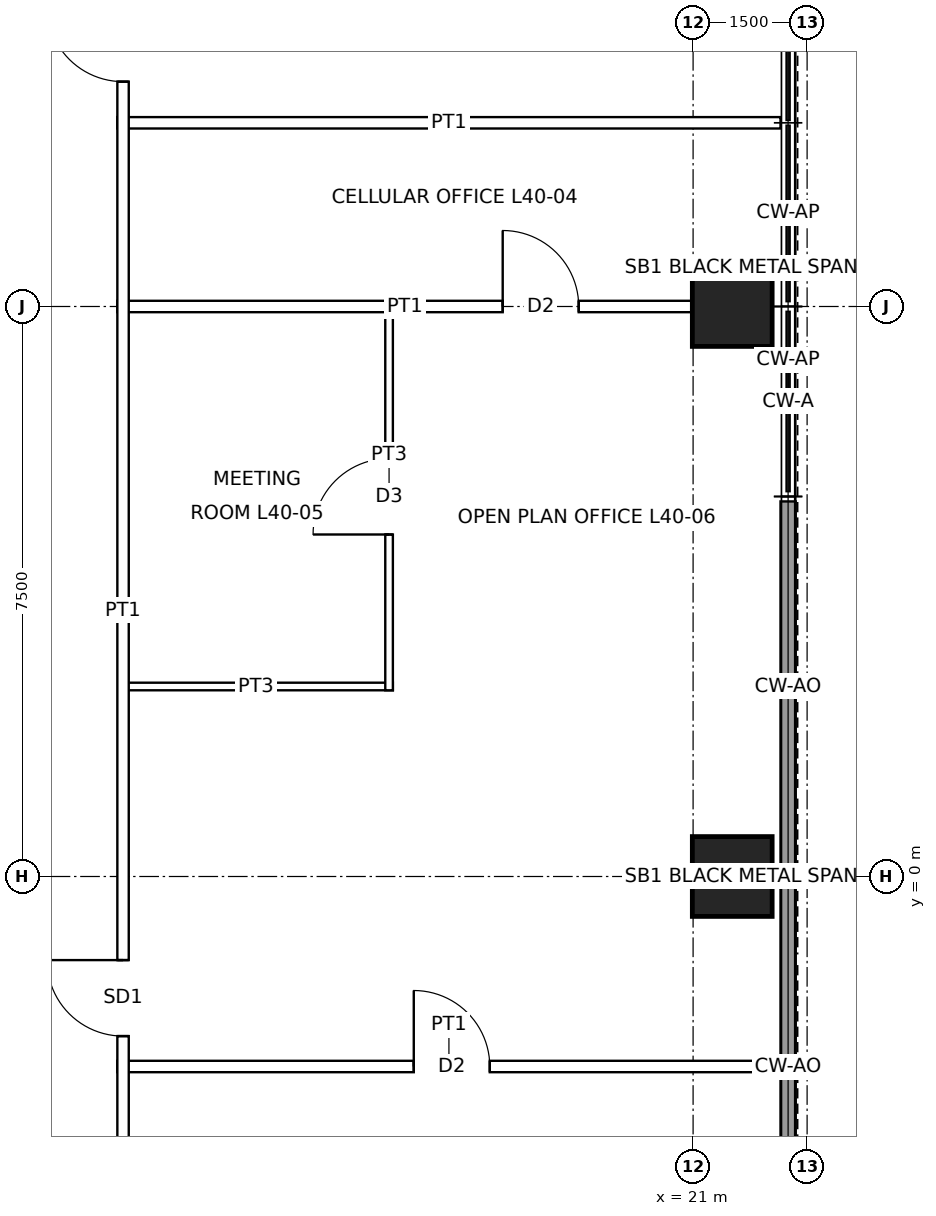
"""IFC4 building model, lengths in metres.
Left out: names, types, materials, properties, quantities, classifications, styles, units other than length and angle.
Written with IfcOpenShell. Run it as: python <this file> out.ifc"""

import sys

from ifc_helpers import new_model, si_unit, direction, frame, frame_2d, origin, origin_2d, place, context, subcontext, project, spatial, rectangle, hollow_rectangle, extrude, element, fill, save


model = new_model("IFC4")
c1 = context("Model", 3, precision=1e-05, world=origin(), true_north=direction((0.0, 1.0)))
c2 = subcontext(c1, "Body", "Model", "MODEL_VIEW")
j1 = project(units=[si_unit("LENGTHUNIT", "METRE"), si_unit("PLANEANGLEUNIT", "RADIAN")], contexts=[c1])
p1 = place(None, origin())
s1 = spatial("IfcSite", under=j1, at=p1, CompositionType="ELEMENT")
p2 = place(p1, origin())
s2 = spatial("IfcBuilding", under=s1, at=p2, CompositionType="ELEMENT")
p3 = place(p2, frame((0.0, 0.0, 193.9)))
s3 = spatial("IfcBuildingStorey", under=s2, at=p3, CompositionType="ELEMENT", Elevation=193.9)
for number, where, z_axis, x_axis in (
    (1, (21.515, 7.5, 0.0), (0.0, 0.0, 1.0), (1.0, 0.0, 0.0)),
    (2, (21.515, 0.0, 0.0), (0.0, 0.0, 1.0), (1.0, 0.0, 0.0)),
):
    element("IfcColumn", number, at=place(p3, frame(where, z_axis=z_axis, x_axis=x_axis)), inside=s3, PredefinedType="COLUMN", context=c2, shape_type="SweptSolid", body=[
        extrude(hollow_rectangle(XDim=1.05, YDim=1.05, WallThickness=0.07, at=origin_2d()), origin(), (0.0, 0.0, 1.0), 4.0),
    ])
for number, where, z_axis, x_axis in (
    (3, (22.25, 4.935, 0.0), (0.0, 0.0, 1.0), (0.0, -1.0, 0.0)),
    (4, (22.25, 2.468, 0.0), (0.0, 0.0, 1.0), (0.0, -1.0, 0.0)),
    (5, (22.25, -0.065, 0.0), (0.0, 0.0, 1.0), (0.0, -1.0, 0.0)),
    (6, (22.25, -2.532, 0.0), (0.0, 0.0, 1.0), (0.0, -1.0, 0.0)),
):
    element("IfcWall", number, at=place(p3, frame(where, z_axis=z_axis, x_axis=x_axis)), inside=s3, PredefinedType="SOLIDWALL", context=c2, shape_type="SweptSolid", body=[
        extrude(rectangle(XDim=2.403, YDim=0.2, at=frame_2d((1.201, 0.0))), origin(), (0.0, 0.0, 1.0), 3.85),
    ])
p4 = place(p3, frame((13.425, -2.5, 0.0), z_axis=(0.0, 0.0, 1.0), x_axis=(1.0, 0.0, 0.0)))
e7 = element("IfcWall", 7, at=p4, inside=s3, PredefinedType="PARTITIONING", context=c2, shape_type="SweptSolid", body=[
    extrude(rectangle(XDim=8.725, YDim=0.15, at=frame_2d((4.362, 0.0))), origin(), (0.0, 0.0, 1.0), 3.85),
])
p5 = place(p4, frame((3.9, 0.0, 0.0)))
e8 = element("IfcOpeningElement", 8, at=p5, cuts=e7, PredefinedType="OPENING", context=c2, shape_type="SweptSolid", body=[
    extrude(rectangle(XDim=1.0, YDim=2.1, at=frame_2d((0.5, 1.05))), frame((0.0, 0.085, 0.0), z_axis=(0.0, -1.0, 0.0), x_axis=(1.0, 0.0, 0.0)), (0.0, 0.0, 1.0), 0.17),
])
p6 = place(p3, frame((13.45, 2.5, 0.0), z_axis=(0.0, 0.0, 1.0), x_axis=(1.0, 0.0, 0.0)))
e9 = element("IfcWall", 9, at=p6, inside=s3, PredefinedType="PARTITIONING", context=c2, shape_type="SweptSolid", body=[
    extrude(rectangle(XDim=3.6, YDim=0.1, at=frame_2d((1.8, 0.0))), origin(), (0.0, 0.0, 1.0), 3.85),
])
p7 = place(p3, frame((13.425, 7.5, 0.0), z_axis=(0.0, 0.0, 1.0), x_axis=(1.0, 0.0, 0.0)))
e10 = element("IfcWall", 10, at=p7, inside=s3, PredefinedType="PARTITIONING", context=c2, shape_type="SweptSolid", body=[
    extrude(rectangle(XDim=7.565, YDim=0.15, at=frame_2d((3.782, 0.0))), origin(), (0.0, 0.0, 1.0), 3.238),
])
p8 = place(p7, frame((5.07, 0.0, 0.0)))
e11 = element("IfcOpeningElement", 11, at=p8, cuts=e10, PredefinedType="OPENING", context=c2, shape_type="SweptSolid", body=[
    extrude(rectangle(XDim=1.0, YDim=2.1, at=frame_2d((0.5, 1.05))), frame((0.0, 0.085, 0.0), z_axis=(0.0, -1.0, 0.0), x_axis=(1.0, 0.0, 0.0)), (0.0, 0.0, 1.0), 0.17),
])
p9 = place(p3, frame((13.425, 9.917, 0.0), z_axis=(0.0, 0.0, 1.0), x_axis=(1.0, 0.0, 0.0)))
e12 = element("IfcWall", 12, at=p9, inside=s3, PredefinedType="PARTITIONING", context=c2, shape_type="SweptSolid", body=[
    extrude(rectangle(XDim=8.725, YDim=0.15, at=frame_2d((4.362, 0.0))), origin(), (0.0, 0.0, 1.0), 3.85),
])
p10 = place(p3, frame((13.5, -5.075, 0.0), z_axis=(0.0, 0.0, 1.0), x_axis=(0.0, 1.0, 0.0)))
e13 = element("IfcWall", 13, at=p10, inside=s3, PredefinedType="PARTITIONING", context=c2, shape_type="SweptSolid", body=[
    extrude(rectangle(XDim=17.15, YDim=0.15, at=frame_2d((8.575, 0.0))), origin(), (0.0, 0.0, 1.0), 3.85),
])
p11 = place(p10, frame((2.975, 0.0, 0.0)))
e14 = element("IfcOpeningElement", 14, at=p11, cuts=e13, PredefinedType="OPENING", context=c2, shape_type="SweptSolid", body=[
    extrude(rectangle(XDim=1.0, YDim=2.4, at=frame_2d((0.5, 1.2))), frame((0.0, 0.085, 0.0), z_axis=(0.0, -1.0, 0.0), x_axis=(1.0, 0.0, 0.0)), (0.0, 0.0, 1.0), 0.17),
])
p12 = place(p10, frame((15.533, 0.0, 0.0)))
e15 = element("IfcOpeningElement", 15, at=p12, cuts=e13, PredefinedType="OPENING", context=c2, shape_type="SweptSolid", body=[
    extrude(rectangle(XDim=1.0, YDim=2.4, at=frame_2d((0.5, 1.2))), frame((0.0, 0.085, 0.0), z_axis=(0.0, -1.0, 0.0), x_axis=(1.0, 0.0, 0.0)), (0.0, 0.0, 1.0), 0.17),
])
p13 = place(p3, frame((17.0, 2.45, 0.0), z_axis=(0.0, 0.0, 1.0), x_axis=(0.0, 1.0, 0.0)))
e16 = element("IfcWall", 16, at=p13, inside=s3, PredefinedType="PARTITIONING", context=c2, shape_type="SweptSolid", body=[
    extrude(rectangle(XDim=5.1, YDim=0.1, at=frame_2d((2.55, 0.0))), origin(), (0.0, 0.0, 1.0), 3.85),
])
p14 = place(p13, frame((2.05, 0.0, 0.0)))
e17 = element("IfcOpeningElement", 17, at=p14, cuts=e16, PredefinedType="OPENING", context=c2, shape_type="SweptSolid", body=[
    extrude(rectangle(XDim=1.0, YDim=2.1, at=frame_2d((0.5, 1.05))), frame((0.0, 0.06, 0.0), z_axis=(0.0, -1.0, 0.0), x_axis=(1.0, 0.0, 0.0)), (0.0, 0.0, 1.0), 0.12),
])
p15 = place(p8, origin())
e18 = element("IfcDoor", 18, at=p15, inside=s3, OperationType="SINGLE_SWING_LEFT", PredefinedType="DOOR", context=c2, shape_type="SweptSolid", body=[
    extrude(rectangle(XDim=1.0, YDim=2.1, at=frame_2d((0.5, 1.05))), frame((0.0, 0.025, 0.0), z_axis=(0.0, -1.0, 0.0), x_axis=(1.0, 0.0, 0.0)), (0.0, 0.0, 1.0), 0.05),
])
fill(e11, e18)
p16 = place(p14, origin())
e19 = element("IfcDoor", 19, at=p16, inside=s3, OperationType="SINGLE_SWING_LEFT", PredefinedType="DOOR", context=c2, shape_type="SweptSolid", body=[
    extrude(rectangle(XDim=1.0, YDim=2.1, at=frame_2d((0.5, 1.05))), frame((0.0, 0.025, 0.0), z_axis=(0.0, -1.0, 0.0), x_axis=(1.0, 0.0, 0.0)), (0.0, 0.0, 1.0), 0.05),
])
fill(e17, e19)
p17 = place(p11, origin())
e20 = element("IfcDoor", 20, at=p17, inside=s3, OperationType="SINGLE_SWING_RIGHT", PredefinedType="DOOR", context=c2, shape_type="SweptSolid", body=[
    extrude(rectangle(XDim=1.0, YDim=2.4, at=frame_2d((0.5, 1.2))), frame((0.0, 0.025, 0.0), z_axis=(0.0, -1.0, 0.0), x_axis=(1.0, 0.0, 0.0)), (0.0, 0.0, 1.0), 0.05),
])
fill(e14, e20)
p18 = place(p5, origin())
e21 = element("IfcDoor", 21, at=p18, inside=s3, OperationType="SINGLE_SWING_LEFT", PredefinedType="DOOR", context=c2, shape_type="SweptSolid", body=[
    extrude(rectangle(XDim=1.0, YDim=2.1, at=frame_2d((0.5, 1.05))), frame((0.0, 0.025, 0.0), z_axis=(0.0, -1.0, 0.0), x_axis=(1.0, 0.0, 0.0)), (0.0, 0.0, 1.0), 0.05),
])
fill(e8, e21)
p19 = place(p12, origin())
e22 = element("IfcDoor", 22, at=p19, inside=s3, OperationType="SINGLE_SWING_RIGHT", PredefinedType="DOOR", context=c2, shape_type="SweptSolid", body=[
    extrude(rectangle(XDim=1.0, YDim=2.4, at=frame_2d((0.5, 1.2))), frame((0.0, 0.025, 0.0), z_axis=(0.0, -1.0, 0.0), x_axis=(1.0, 0.0, 0.0)), (0.0, 0.0, 1.0), 0.05),
])
fill(e15, e22)
save(model, sys.argv[1])
